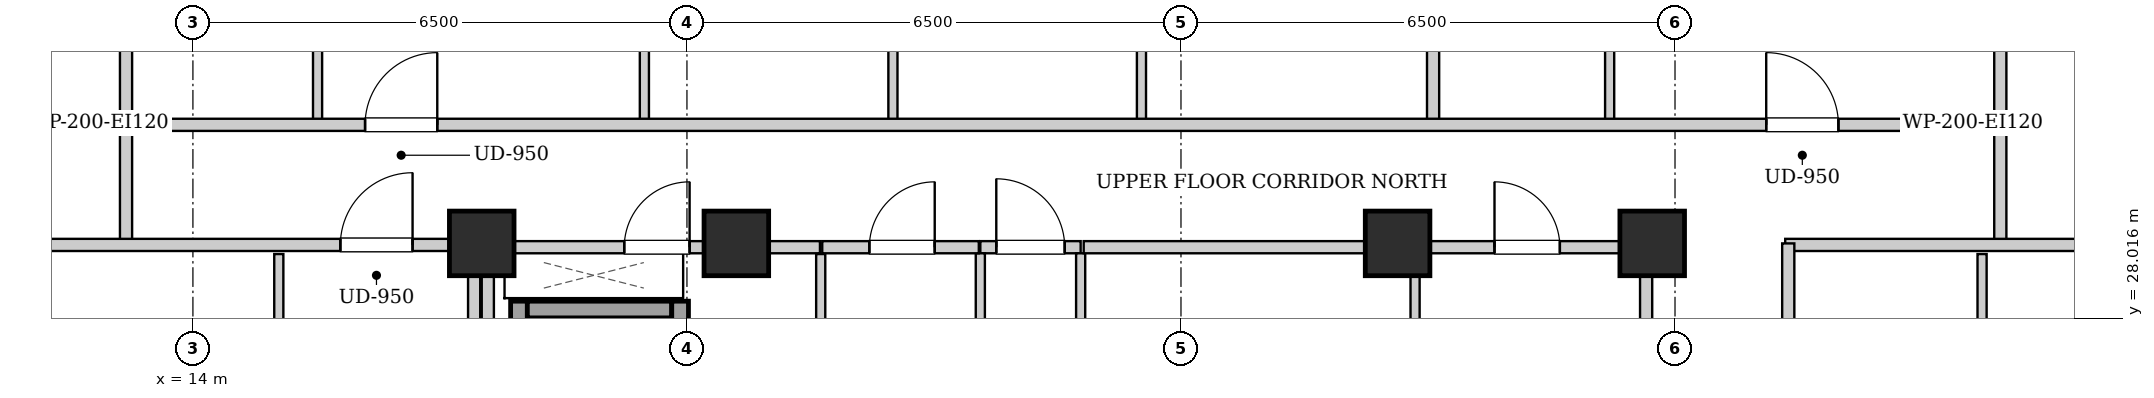
"""IFC4 building model, lengths in metres.
Left out: names, types, materials, properties, quantities, classifications, styles, units other than length and angle.
Written with IfcOpenShell. Run it as: python <this file> out.ifc"""

import sys

from ifc_helpers import new_model, si_unit, direction, frame, frame_2d, origin, origin_2d, place, context, subcontext, project, spatial, rectangle, extrude, element, fill, save


model = new_model("IFC4")
c1 = context("Model", 3, precision=1e-05, world=origin(), true_north=direction((0.0, 1.0)))
c2 = subcontext(c1, "Body", "Model", "MODEL_VIEW")
j1 = project(units=[si_unit("LENGTHUNIT", "METRE"), si_unit("PLANEANGLEUNIT", "RADIAN")], contexts=[c1])
p1 = place(None, origin())
s1 = spatial("IfcSite", under=j1, at=p1, CompositionType="ELEMENT")
p2 = place(p1, origin())
s2 = spatial("IfcBuilding", under=s1, at=p2, CompositionType="ELEMENT")
p3 = place(p2, frame((0.0, 0.0, 204.1)))
s3 = spatial("IfcBuildingStorey", under=s2, at=p3, CompositionType="ELEMENT", Elevation=204.1)
for number, where, z_axis, x_axis in (
    (1, (17.8, 29.0, 0.0), (0.0, 0.0, 1.0), (1.0, 0.0, 0.0)),
    (2, (21.15, 29.0, 0.0), (0.0, 0.0, 1.0), (1.0, 0.0, 0.0)),
    (3, (29.85, 29.0, 0.0), (0.0, 0.0, 1.0), (1.0, 0.0, 0.0)),
    (4, (33.2, 29.0, 0.0), (0.0, 0.0, 1.0), (1.0, 0.0, 0.0)),
):
    element("IfcColumn", number, at=place(p3, frame(where, z_axis=z_axis, x_axis=x_axis)), inside=s3, PredefinedType="COLUMN", context=c2, shape_type="SweptSolid", body=[
        extrude(rectangle(XDim=0.85, YDim=0.85, at=origin_2d()), origin(), (0.0, 0.0, 1.0), 3.3),
    ])
p4 = place(p3, frame((18.29, 24.1, 0.0), z_axis=(0.0, 0.0, 1.0), x_axis=(0.0, 1.0, 0.0)))
e5 = element("IfcWall", 5, at=p4, inside=s3, PredefinedType="SHEAR", context=c2, shape_type="SweptSolid", body=[
    extrude(rectangle(XDim=4.14, YDim=0.22, at=frame_2d((2.07, 0.0))), origin(), (0.0, 0.0, 1.0), 3.04),
])
p5 = place(p3, frame((18.4, 28.13, 0.0), z_axis=(0.0, 0.0, 1.0), x_axis=(1.0, 0.0, 0.0)))
e6 = element("IfcWall", 6, at=p5, inside=s3, PredefinedType="SHEAR", context=c2, shape_type="SweptSolid", body=[
    extrude(rectangle(XDim=1.9, YDim=0.22, at=frame_2d((0.95, 0.0))), origin(), (0.0, 0.0, 1.0), 3.04),
])
p6 = place(p3, frame((20.41, 26.06, 0.0), z_axis=(0.0, 0.0, 1.0), x_axis=(0.0, 1.0, 0.0)))
e7 = element("IfcWall", 7, at=p6, inside=s3, PredefinedType="SHEAR", context=c2, shape_type="SweptSolid", body=[
    extrude(rectangle(XDim=2.18, YDim=0.22, at=frame_2d((1.09, 0.0))), origin(), (0.0, 0.0, 1.0), 3.04),
])
p7 = place(p6, frame((0.54, 0.0, 0.0)))
e8 = element("IfcOpeningElement", 8, at=p7, cuts=e7, PredefinedType="OPENING", context=c2, shape_type="SweptSolid", body=[
    extrude(rectangle(XDim=1.1, YDim=2.15, at=frame_2d((0.55, 1.075))), frame((0.0, 0.12, 0.0), z_axis=(0.0, -1.0, 0.0), x_axis=(1.0, 0.0, 0.0)), (0.0, 0.0, 1.0), 0.24),
])
for number, where, z_axis, x_axis in (
    (9, (17.88, 24.12, 0.0), (0.0, 0.0, 1.0), (0.0, 1.0, 0.0)),
    (10, (33.12, 24.12, 0.0), (0.0, 0.0, 1.0), (0.0, 1.0, 0.0)),
):
    element("IfcWall", number, at=place(p3, frame(where, z_axis=z_axis, x_axis=x_axis)), inside=s3, PredefinedType="PARTITIONING", context=c2, shape_type="SweptSolid", body=[
        extrude(rectangle(XDim=4.76, YDim=0.16, at=frame_2d((2.38, 0.0))), origin(), (0.0, 0.0, 1.0), 3.04),
    ])
p8 = place(p3, frame((24.36, 28.95, 0.0), z_axis=(0.0, 0.0, 1.0), x_axis=(1.0, 0.0, 0.0)))
e11 = element("IfcWall", 11, at=p8, inside=s3, PredefinedType="PARTITIONING", context=c2, shape_type="SweptSolid", body=[
    extrude(rectangle(XDim=1.32, YDim=0.16, at=frame_2d((0.66, 0.0))), origin(), (0.0, 0.0, 1.0), 2.556),
])
p9 = place(p8, frame((0.21, 0.0, 0.0)))
e12 = element("IfcOpeningElement", 12, at=p9, cuts=e11, PredefinedType="OPENING", context=c2, shape_type="SweptSolid", body=[
    extrude(rectangle(XDim=0.9, YDim=2.05, at=frame_2d((0.45, 1.025))), frame((0.0, 0.09, 0.0), z_axis=(0.0, -1.0, 0.0), x_axis=(1.0, 0.0, 0.0)), (0.0, 0.0, 1.0), 0.18),
])
p10 = place(p3, frame((17.96, 28.95, 0.0), z_axis=(0.0, 0.0, 1.0), x_axis=(1.0, 0.0, 0.0)))
e13 = element("IfcWall", 13, at=p10, inside=s3, PredefinedType="PARTITIONING", context=c2, shape_type="SweptSolid", body=[
    extrude(rectangle(XDim=4.29, YDim=0.16, at=frame_2d((2.145, 0.0))), origin(), (0.0, 0.0, 1.0), 2.556),
])
p11 = place(p10, frame((1.715, 0.0, 0.0)))
e14 = element("IfcOpeningElement", 14, at=p11, cuts=e13, PredefinedType="OPENING", context=c2, shape_type="SweptSolid", body=[
    extrude(rectangle(XDim=0.86, YDim=2.05, at=frame_2d((0.43, 1.025))), frame((0.0, 0.09, 0.0), z_axis=(0.0, -1.0, 0.0), x_axis=(1.0, 0.0, 0.0)), (0.0, 0.0, 1.0), 0.18),
])
for number, where, z_axis, x_axis in (
    (15, (24.36, 25.0, 0.0), (0.0, 0.0, 1.0), (0.0, 1.0, 0.0)),
    (16, (25.68, 25.0, 0.0), (0.0, 0.0, 1.0), (0.0, 1.0, 0.0)),
):
    element("IfcWall", number, at=place(p3, frame(where, z_axis=z_axis, x_axis=x_axis)), inside=s3, PredefinedType="PARTITIONING", context=c2, shape_type="SweptSolid", body=[
        extrude(rectangle(XDim=3.87, YDim=0.12, at=frame_2d((1.935, 0.0))), origin(), (0.0, 0.0, 1.0), 3.04),
    ])
p12 = place(p3, frame((30.08, 26.18, 0.0), z_axis=(0.0, 0.0, 1.0), x_axis=(0.0, 1.0, 0.0)))
e17 = element("IfcWall", 17, at=p12, inside=s3, PredefinedType="PARTITIONING", context=c2, shape_type="SweptSolid", body=[
    extrude(rectangle(XDim=2.68, YDim=0.12, at=frame_2d((1.34, 0.0))), origin(), (0.0, 0.0, 1.0), 3.04),
])
p13 = place(p3, frame((30.08, 28.95, 0.0), z_axis=(0.0, 0.0, 1.0), x_axis=(1.0, 0.0, 0.0)))
e18 = element("IfcWall", 18, at=p13, inside=s3, PredefinedType="PARTITIONING", context=c2, shape_type="SweptSolid", body=[
    extrude(rectangle(XDim=2.96, YDim=0.16, at=frame_2d((1.48, 0.0))), origin(), (0.0, 0.0, 1.0), 3.04),
])
p14 = place(p13, frame((1.045, 0.0, 0.0)))
e19 = element("IfcOpeningElement", 19, at=p14, cuts=e18, PredefinedType="OPENING", context=c2, shape_type="SweptSolid", body=[
    extrude(rectangle(XDim=0.86, YDim=2.05, at=frame_2d((0.43, 1.025))), frame((0.0, 0.09, 0.0), z_axis=(0.0, -1.0, 0.0), x_axis=(1.0, 0.0, 0.0)), (0.0, 0.0, 1.0), 0.18),
])
p15 = place(p3, frame((22.26, 25.0, 0.0), z_axis=(0.0, 0.0, 1.0), x_axis=(0.0, 1.0, 0.0)))
e20 = element("IfcWall", 20, at=p15, inside=s3, PredefinedType="PARTITIONING", context=c2, shape_type="SweptSolid", body=[
    extrude(rectangle(XDim=3.86, YDim=0.12, at=frame_2d((1.93, 0.0))), origin(), (0.0, 0.0, 1.0), 3.04),
])
p16 = place(p3, frame((22.28, 28.95, 0.0), z_axis=(0.0, 0.0, 1.0), x_axis=(1.0, 0.0, 0.0)))
e21 = element("IfcWall", 21, at=p16, inside=s3, PredefinedType="PARTITIONING", context=c2, shape_type="SweptSolid", body=[
    extrude(rectangle(XDim=2.06, YDim=0.16, at=frame_2d((1.03, 0.0))), origin(), (0.0, 0.0, 1.0), 2.556),
])
p17 = place(p16, frame((0.62, 0.0, 0.0)))
e22 = element("IfcOpeningElement", 22, at=p17, cuts=e21, PredefinedType="OPENING", context=c2, shape_type="SweptSolid", body=[
    extrude(rectangle(XDim=0.86, YDim=2.05, at=frame_2d((0.43, 1.025))), frame((0.0, 0.09, 0.0), z_axis=(0.0, -1.0, 0.0), x_axis=(1.0, 0.0, 0.0)), (0.0, 0.0, 1.0), 0.18),
])
p18 = place(p3, frame((25.72, 28.95, 0.0), z_axis=(0.0, 0.0, 1.0), x_axis=(1.0, 0.0, 0.0)))
e23 = element("IfcWall", 23, at=p18, inside=s3, PredefinedType="PARTITIONING", context=c2, shape_type="SweptSolid", body=[
    extrude(rectangle(XDim=4.32, YDim=0.16, at=frame_2d((2.16, 0.0))), origin(), (0.0, 0.0, 1.0), 2.556),
])
for number, where, z_axis, x_axis in (
    (24, (13.12, 28.98, 0.0), (0.0, 0.0, 1.0), (0.0, 1.0, 0.0)),
    (25, (37.78, 28.98, 0.0), (0.0, 0.0, 1.0), (0.0, 1.0, 0.0)),
):
    element("IfcWall", number, at=place(p3, frame(where, z_axis=z_axis, x_axis=x_axis)), inside=s3, PredefinedType="PARTITIONING", context=c2, shape_type="SweptSolid", body=[
        extrude(rectangle(XDim=1.58, YDim=0.16, at=frame_2d((0.79, 0.0))), origin(), (0.0, 0.0, 1.0), 3.04),
    ])
p19 = place(p3, frame((34.95, 28.98, 0.0), z_axis=(0.0, 0.0, 1.0), x_axis=(1.0, 0.0, 0.0)))
e26 = element("IfcWall", 26, at=p19, inside=s3, PredefinedType="PARTITIONING", context=c2, shape_type="SweptSolid", body=[
    extrude(rectangle(XDim=5.07, YDim=0.16, at=frame_2d((2.535, 0.0))), origin(), (0.0, 0.0, 1.0), 2.556),
])
p20 = place(p3, frame((13.12, 30.6, 0.0), z_axis=(0.0, 0.0, 1.0), x_axis=(0.0, 1.0, 0.0)))
e27 = element("IfcWall", 27, at=p20, inside=s3, PredefinedType="PARTITIONING", context=c2, shape_type="SweptSolid", body=[
    extrude(rectangle(XDim=2.91, YDim=0.16, at=frame_2d((1.455, 0.0))), origin(), (0.0, 0.0, 1.0), 3.04),
])
p21 = place(p3, frame((15.64, 30.6, 0.0), z_axis=(0.0, 0.0, 1.0), x_axis=(0.0, 1.0, 0.0)))
e28 = element("IfcWall", 28, at=p21, inside=s3, PredefinedType="PARTITIONING", context=c2, shape_type="SweptSolid", body=[
    extrude(rectangle(XDim=2.85, YDim=0.12, at=frame_2d((1.425, 0.0))), origin(), (0.0, 0.0, 1.0), 3.04),
])
p22 = place(p21, frame((0.995, 0.0, 0.0)))
e29 = element("IfcOpeningElement", 29, at=p22, cuts=e28, PredefinedType="OPENING", context=c2, shape_type="SweptSolid", body=[
    extrude(rectangle(XDim=0.86, YDim=2.05, at=frame_2d((0.43, 1.025))), frame((0.0, 0.07, 0.0), z_axis=(0.0, -1.0, 0.0), x_axis=(1.0, 0.0, 0.0)), (0.0, 0.0, 1.0), 0.14),
])
p23 = place(p3, frame((19.94, 30.6, 0.0), z_axis=(0.0, 0.0, 1.0), x_axis=(0.0, 1.0, 0.0)))
e30 = element("IfcWall", 30, at=p23, inside=s3, PredefinedType="PARTITIONING", context=c2, shape_type="SweptSolid", body=[
    extrude(rectangle(XDim=2.85, YDim=0.12, at=frame_2d((1.425, 0.0))), origin(), (0.0, 0.0, 1.0), 3.04),
])
p24 = place(p23, frame((0.975, 0.0, 0.0)))
e31 = element("IfcOpeningElement", 31, at=p24, cuts=e30, PredefinedType="OPENING", context=c2, shape_type="SweptSolid", body=[
    extrude(rectangle(XDim=0.9, YDim=2.05, at=frame_2d((0.45, 1.025))), frame((0.0, 0.07, 0.0), z_axis=(0.0, -1.0, 0.0), x_axis=(1.0, 0.0, 0.0)), (0.0, 0.0, 1.0), 0.14),
])
p25 = place(p3, frame((23.21, 30.6, 0.0), z_axis=(0.0, 0.0, 1.0), x_axis=(0.0, 1.0, 0.0)))
e32 = element("IfcWall", 32, at=p25, inside=s3, PredefinedType="PARTITIONING", context=c2, shape_type="SweptSolid", body=[
    extrude(rectangle(XDim=2.85, YDim=0.12, at=frame_2d((1.425, 0.0))), origin(), (0.0, 0.0, 1.0), 3.04),
])
p26 = place(p25, frame((0.975, 0.0, 0.0)))
e33 = element("IfcOpeningElement", 33, at=p26, cuts=e32, PredefinedType="OPENING", context=c2, shape_type="SweptSolid", body=[
    extrude(rectangle(XDim=0.9, YDim=2.05, at=frame_2d((0.45, 1.025))), frame((0.0, 0.07, 0.0), z_axis=(0.0, -1.0, 0.0), x_axis=(1.0, 0.0, 0.0)), (0.0, 0.0, 1.0), 0.14),
])
p27 = place(p3, frame((26.48, 30.6, 0.0), z_axis=(0.0, 0.0, 1.0), x_axis=(0.0, 1.0, 0.0)))
e34 = element("IfcWall", 34, at=p27, inside=s3, PredefinedType="PARTITIONING", context=c2, shape_type="SweptSolid", body=[
    extrude(rectangle(XDim=2.85, YDim=0.12, at=frame_2d((1.425, 0.0))), origin(), (0.0, 0.0, 1.0), 3.04),
])
p28 = place(p27, frame((0.975, 0.0, 0.0)))
e35 = element("IfcOpeningElement", 35, at=p28, cuts=e34, PredefinedType="OPENING", context=c2, shape_type="SweptSolid", body=[
    extrude(rectangle(XDim=0.9, YDim=2.05, at=frame_2d((0.45, 1.025))), frame((0.0, 0.07, 0.0), z_axis=(0.0, -1.0, 0.0), x_axis=(1.0, 0.0, 0.0)), (0.0, 0.0, 1.0), 0.14),
])
p29 = place(p3, frame((37.78, 30.6, 0.0), z_axis=(0.0, 0.0, 1.0), x_axis=(0.0, 1.0, 0.0)))
e36 = element("IfcWall", 36, at=p29, inside=s3, PredefinedType="PARTITIONING", context=c2, shape_type="SweptSolid", body=[
    extrude(rectangle(XDim=2.91, YDim=0.16, at=frame_2d((1.455, 0.0))), origin(), (0.0, 0.0, 1.0), 3.04),
])
p30 = place(p3, frame((30.317, 30.6, 0.0), z_axis=(0.0, 0.0, 1.0), x_axis=(0.0, 1.0, 0.0)))
e37 = element("IfcWall", 37, at=p30, inside=s3, PredefinedType="PARTITIONING", context=c2, shape_type="SweptSolid", body=[
    extrude(rectangle(XDim=9.32, YDim=0.16, at=frame_2d((4.66, 0.0))), origin(), (0.0, 0.0, 1.0), 3.04),
])
p31 = place(p3, frame((32.64, 30.6, 0.0), z_axis=(0.0, 0.0, 1.0), x_axis=(0.0, 1.0, 0.0)))
e38 = element("IfcWall", 38, at=p31, inside=s3, PredefinedType="PARTITIONING", context=c2, shape_type="SweptSolid", body=[
    extrude(rectangle(XDim=2.85, YDim=0.12, at=frame_2d((1.425, 0.0))), origin(), (0.0, 0.0, 1.0), 3.04),
])
p32 = place(p31, frame((0.995, 0.0, 0.0)))
e39 = element("IfcOpeningElement", 39, at=p32, cuts=e38, PredefinedType="OPENING", context=c2, shape_type="SweptSolid", body=[
    extrude(rectangle(XDim=0.86, YDim=2.05, at=frame_2d((0.43, 1.025))), frame((0.0, 0.07, 0.0), z_axis=(0.0, -1.0, 0.0), x_axis=(1.0, 0.0, 0.0)), (0.0, 0.0, 1.0), 0.14),
])
p33 = place(p3, frame((10.88, 28.98, 0.0), z_axis=(0.0, 0.0, 1.0), x_axis=(1.0, 0.0, 0.0)))
e40 = element("IfcWall", 40, at=p33, inside=s3, PredefinedType="PARTITIONING", context=c2, shape_type="SweptSolid", body=[
    extrude(rectangle(XDim=6.88, YDim=0.16, at=frame_2d((3.44, 0.0))), origin(), (0.0, 0.0, 1.0), 2.556),
])
p34 = place(p33, frame((5.06, 0.0, 0.0)))
e41 = element("IfcOpeningElement", 41, at=p34, cuts=e40, PredefinedType="OPENING", context=c2, shape_type="SweptSolid", body=[
    extrude(rectangle(XDim=0.95, YDim=2.1, at=frame_2d((0.475, 1.05))), frame((0.0, 0.09, 0.0), z_axis=(0.0, -1.0, 0.0), x_axis=(1.0, 0.0, 0.0)), (0.0, 0.0, 1.0), 0.18),
])
p35 = place(p3, frame((15.13, 25.052, 0.0), z_axis=(0.0, 0.0, 1.0), x_axis=(0.0, 1.0, 0.0)))
e42 = element("IfcWall", 42, at=p35, inside=s3, PredefinedType="PARTITIONING", context=c2, shape_type="SweptSolid", body=[
    extrude(rectangle(XDim=3.808, YDim=0.12, at=frame_2d((1.904, 0.0))), origin(), (0.0, 0.0, 1.0), 3.04),
])
p36 = place(p35, frame((1.454, 0.0, 0.0)))
e43 = element("IfcOpeningElement", 43, at=p36, cuts=e42, PredefinedType="OPENING", context=c2, shape_type="SweptSolid", body=[
    extrude(rectangle(XDim=0.9, YDim=2.05, at=frame_2d((0.45, 1.025))), frame((0.0, 0.07, 0.0), z_axis=(0.0, -1.0, 0.0), x_axis=(1.0, 0.0, 0.0)), (0.0, 0.0, 1.0), 0.14),
])
p37 = place(p3, frame((37.54, 24.552, 0.0), z_axis=(0.0, 0.0, 1.0), x_axis=(0.0, 1.0, 0.0)))
e44 = element("IfcWall", 44, at=p37, inside=s3, PredefinedType="PARTITIONING", context=c2, shape_type="SweptSolid", body=[
    extrude(rectangle(XDim=4.308, YDim=0.12, at=frame_2d((2.154, 0.0))), origin(), (0.0, 0.0, 1.0), 3.04),
])
p38 = place(p37, frame((1.704, 0.0, 0.0)))
e45 = element("IfcOpeningElement", 45, at=p38, cuts=e44, PredefinedType="OPENING", context=c2, shape_type="SweptSolid", body=[
    extrude(rectangle(XDim=0.9, YDim=2.05, at=frame_2d((0.45, 1.025))), frame((0.0, 0.07, 0.0), z_axis=(0.0, -1.0, 0.0), x_axis=(1.0, 0.0, 0.0)), (0.0, 0.0, 1.0), 0.14),
])
p39 = place(p3, frame((13.15, 30.56, 0.0), z_axis=(0.0, 0.0, 1.0), x_axis=(1.0, 0.0, 0.0)))
e46 = element("IfcWall", 46, at=p39, inside=s3, PredefinedType="PARTITIONING", context=c2, shape_type="SweptSolid", body=[
    extrude(rectangle(XDim=24.6, YDim=0.16, at=frame_2d((12.3, 0.0))), origin(), (0.0, 0.0, 1.0), 3.04),
])
p40 = place(p39, frame((3.115, 0.0, 0.0)))
e47 = element("IfcOpeningElement", 47, at=p40, cuts=e46, PredefinedType="OPENING", context=c2, shape_type="SweptSolid", body=[
    extrude(rectangle(XDim=0.95, YDim=2.1, at=frame_2d((0.475, 1.05))), frame((0.0, 0.09, 0.0), z_axis=(0.0, -1.0, 0.0), x_axis=(1.0, 0.0, 0.0)), (0.0, 0.0, 1.0), 0.18),
])
p41 = place(p39, frame((21.55, 0.0, 0.0)))
e48 = element("IfcOpeningElement", 48, at=p41, cuts=e46, PredefinedType="OPENING", context=c2, shape_type="SweptSolid", body=[
    extrude(rectangle(XDim=0.95, YDim=2.1, at=frame_2d((0.475, 1.05))), frame((0.0, 0.09, 0.0), z_axis=(0.0, -1.0, 0.0), x_axis=(1.0, 0.0, 0.0)), (0.0, 0.0, 1.0), 0.18),
])
p42 = place(p3, frame((17.7, 15.02, 0.0), z_axis=(0.0, 0.0, 1.0), x_axis=(0.0, 1.0, 0.0)))
e49 = element("IfcWall", 49, at=p42, inside=s3, PredefinedType="PARTITIONING", context=c2, shape_type="SweptSolid", body=[
    extrude(rectangle(XDim=13.98, YDim=0.16, at=frame_2d((6.99, 0.0))), origin(), (0.0, 0.0, 1.0), 3.04),
])
p43 = place(p3, frame((34.99, 15.07, 0.0), z_axis=(0.0, 0.0, 1.0), x_axis=(0.0, 1.0, 0.0)))
e50 = element("IfcWall", 50, at=p43, inside=s3, PredefinedType="PARTITIONING", context=c2, shape_type="SweptSolid", body=[
    extrude(rectangle(XDim=13.93, YDim=0.16, at=frame_2d((6.965, 0.0))), origin(), (0.0, 0.0, 1.0), 3.04),
])
p44 = place(p43, frame((4.385, 0.0, 0.0)))
e51 = element("IfcOpeningElement", 51, at=p44, cuts=e50, PredefinedType="OPENING", context=c2, shape_type="SweptSolid", body=[
    extrude(rectangle(XDim=0.95, YDim=2.1, at=frame_2d((0.475, 1.05))), frame((0.0, 0.09, 0.0), z_axis=(0.0, -1.0, 0.0), x_axis=(1.0, 0.0, 0.0)), (0.0, 0.0, 1.0), 0.18),
])
p45 = place(p9, origin())
e52 = element("IfcDoor", 52, at=p45, inside=s3, OperationType="SINGLE_SWING_LEFT", PredefinedType="DOOR", context=c2, shape_type="SweptSolid", body=[
    extrude(rectangle(XDim=0.9, YDim=2.05, at=frame_2d((0.45, 1.025))), frame((0.0, 0.025, 0.0), z_axis=(0.0, -1.0, 0.0), x_axis=(1.0, 0.0, 0.0)), (0.0, 0.0, 1.0), 0.05),
])
fill(e12, e52)
p46 = place(p11, origin())
e53 = element("IfcDoor", 53, at=p46, inside=s3, OperationType="SINGLE_SWING_RIGHT", PredefinedType="DOOR", context=c2, shape_type="SweptSolid", body=[
    extrude(rectangle(XDim=0.86, YDim=2.05, at=frame_2d((0.43, 1.025))), frame((0.0, 0.025, 0.0), z_axis=(0.0, -1.0, 0.0), x_axis=(1.0, 0.0, 0.0)), (0.0, 0.0, 1.0), 0.05),
])
fill(e14, e53)
p47 = place(p14, origin())
e54 = element("IfcDoor", 54, at=p47, inside=s3, OperationType="SINGLE_SWING_LEFT", PredefinedType="DOOR", context=c2, shape_type="SweptSolid", body=[
    extrude(rectangle(XDim=0.86, YDim=2.05, at=frame_2d((0.43, 1.025))), frame((0.0, 0.025, 0.0), z_axis=(0.0, -1.0, 0.0), x_axis=(1.0, 0.0, 0.0)), (0.0, 0.0, 1.0), 0.05),
])
fill(e19, e54)
p48 = place(p17, origin())
e55 = element("IfcDoor", 55, at=p48, inside=s3, OperationType="SINGLE_SWING_RIGHT", PredefinedType="DOOR", context=c2, shape_type="SweptSolid", body=[
    extrude(rectangle(XDim=0.86, YDim=2.05, at=frame_2d((0.43, 1.025))), frame((0.0, 0.025, 0.0), z_axis=(0.0, -1.0, 0.0), x_axis=(1.0, 0.0, 0.0)), (0.0, 0.0, 1.0), 0.05),
])
fill(e22, e55)
p49 = place(p34, origin())
e56 = element("IfcDoor", 56, at=p49, inside=s3, OperationType="SINGLE_SWING_RIGHT", PredefinedType="DOOR", context=c2, shape_type="SweptSolid", body=[
    extrude(rectangle(XDim=0.95, YDim=2.1, at=frame_2d((0.475, 1.05))), frame((0.0, 0.025, 0.0), z_axis=(0.0, -1.0, 0.0), x_axis=(1.0, 0.0, 0.0)), (0.0, 0.0, 1.0), 0.05),
])
fill(e41, e56)
p50 = place(p40, origin())
e57 = element("IfcDoor", 57, at=p50, inside=s3, OperationType="SINGLE_SWING_RIGHT", PredefinedType="DOOR", context=c2, shape_type="SweptSolid", body=[
    extrude(rectangle(XDim=0.95, YDim=2.1, at=frame_2d((0.475, 1.05))), frame((0.0, 0.025, 0.0), z_axis=(0.0, -1.0, 0.0), x_axis=(1.0, 0.0, 0.0)), (0.0, 0.0, 1.0), 0.05),
])
fill(e47, e57)
p51 = place(p41, origin())
e58 = element("IfcDoor", 58, at=p51, inside=s3, OperationType="SINGLE_SWING_LEFT", PredefinedType="DOOR", context=c2, shape_type="SweptSolid", body=[
    extrude(rectangle(XDim=0.95, YDim=2.1, at=frame_2d((0.475, 1.05))), frame((0.0, 0.025, 0.0), z_axis=(0.0, -1.0, 0.0), x_axis=(1.0, 0.0, 0.0)), (0.0, 0.0, 1.0), 0.05),
])
fill(e48, e58)
save(model, sys.argv[1])
